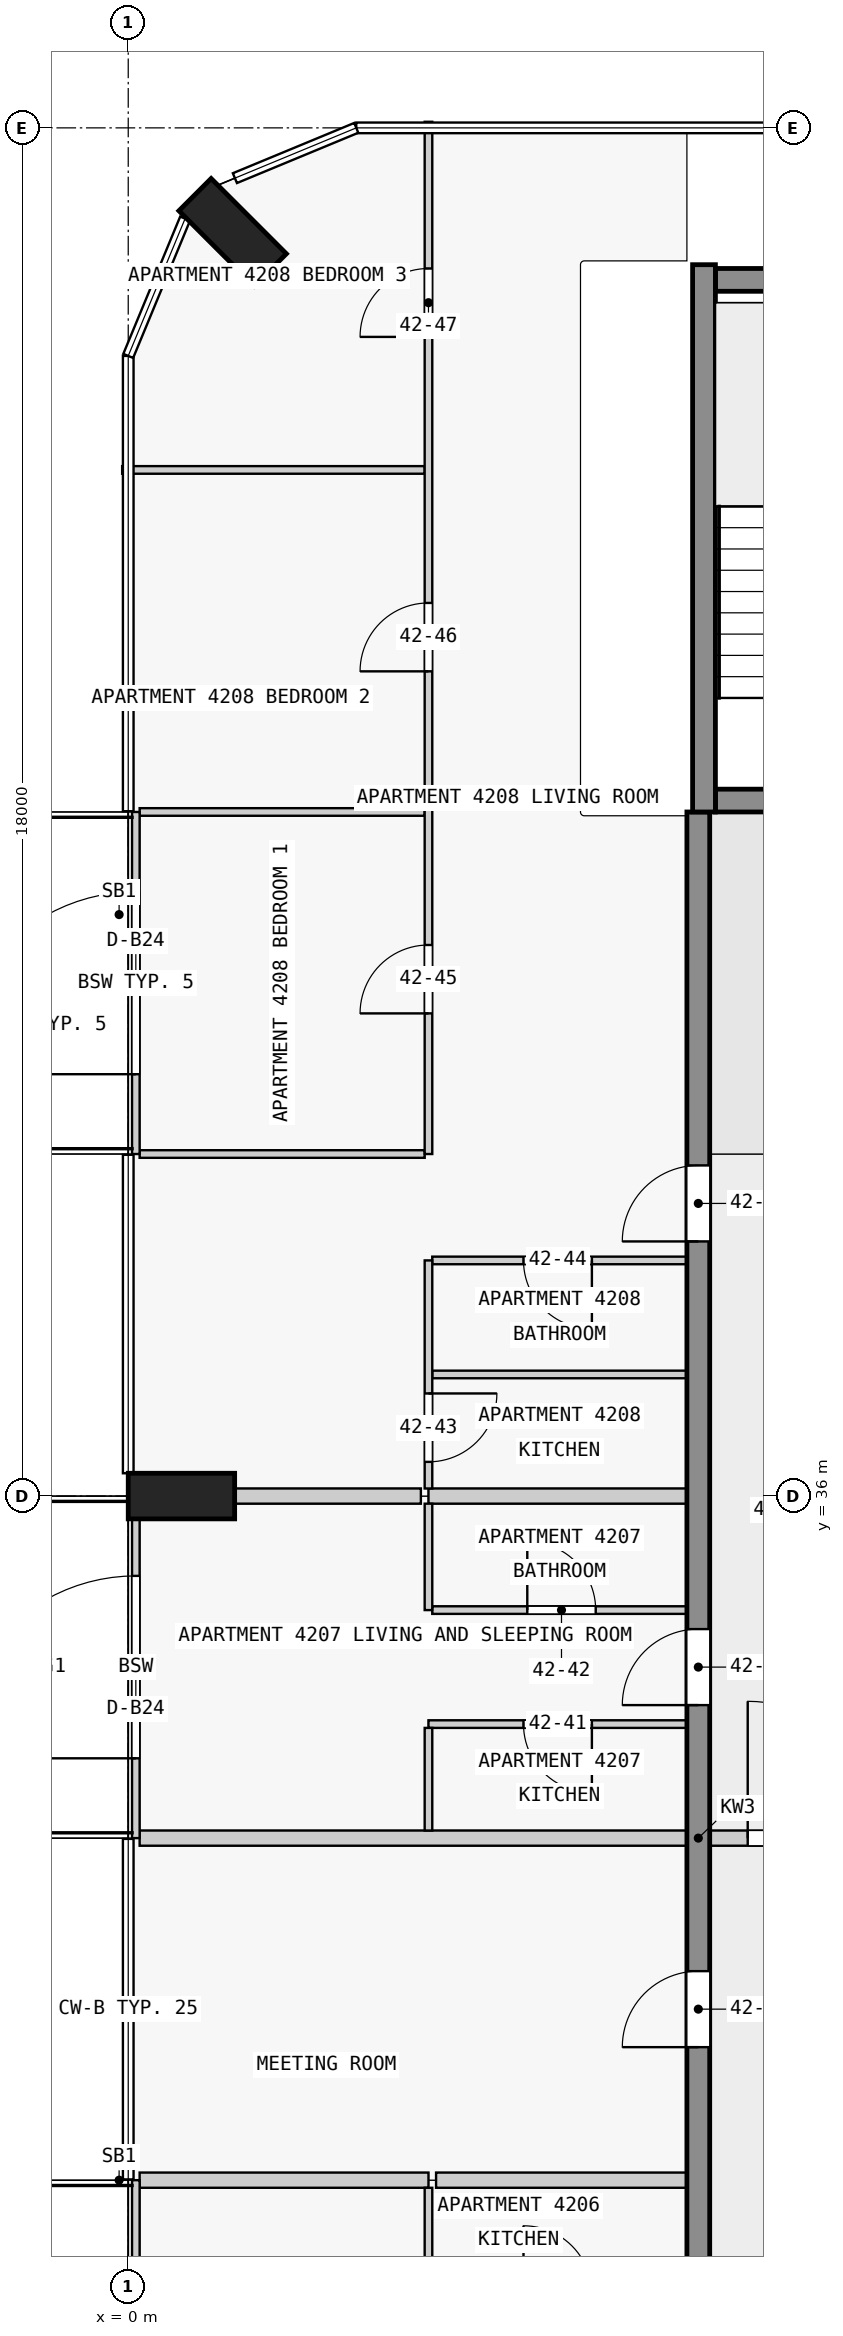
"""IFC4 building model, lengths in metres.
Left out: names, types, materials, properties, quantities, classifications, styles, units other than length and angle.
Written with IfcOpenShell. Run it as: python <this file> out.ifc"""

import sys

from ifc_helpers import new_model, si_unit, direction, frame, frame_2d, origin, origin_2d, place, context, subcontext, project, spatial, rectangle, extrude, element, fill, save


model = new_model("IFC4")
c1 = context("Model", 3, precision=1e-05, world=origin(), true_north=direction((0.0, 1.0)))
c2 = subcontext(c1, "Body", "Model", "MODEL_VIEW")
j1 = project(units=[si_unit("LENGTHUNIT", "METRE"), si_unit("PLANEANGLEUNIT", "RADIAN")], contexts=[c1])
p1 = place(None, origin())
s1 = spatial("IfcSite", under=j1, at=p1, CompositionType="ELEMENT")
p2 = place(p1, origin())
s2 = spatial("IfcBuilding", under=s1, at=p2, CompositionType="ELEMENT")
p3 = place(p2, frame((0.0, 0.0, 163.9)))
s3 = spatial("IfcBuildingStorey", under=s2, at=p3, CompositionType="ELEMENT", Elevation=163.9)
for number, where, z_axis, x_axis in (
    (1, (1.374, 52.626, 0.0), (0.0, 0.0, 1.0), (0.707, 0.707, 0.0)),
    (2, (0.7, 36.0, 0.0), (0.0, 0.0, 1.0), (0.0, 1.0, 0.0)),
):
    element("IfcColumn", number, at=place(p3, frame(where, z_axis=z_axis, x_axis=x_axis)), inside=s3, PredefinedType="COLUMN", context=c2, shape_type="SweptSolid", body=[
        extrude(rectangle(XDim=0.6, YDim=1.4, at=origin_2d()), origin(), (0.0, 0.0, 1.0), 3.5),
    ])
p4 = place(p3, frame((7.725, 45.15, 0.0), z_axis=(0.0, 0.0, 1.0), x_axis=(1.0, 0.0, 0.0)))
e3 = element("IfcWall", 3, at=p4, inside=s3, PredefinedType="SHEAR", context=c2, shape_type="SweptSolid", body=[
    extrude(rectangle(XDim=2.55, YDim=0.3, at=frame_2d((1.275, 0.0))), origin(), (0.0, 0.0, 1.0), 3.5),
])
p5 = place(p4, frame((0.725, 0.0, 0.0)))
e4 = element("IfcOpeningElement", 4, at=p5, cuts=e3, PredefinedType="OPENING", context=c2, shape_type="SweptSolid", body=[
    extrude(rectangle(XDim=1.1, YDim=2.1, at=frame_2d((0.55, 1.05))), frame((0.0, 0.16, 0.0), z_axis=(0.0, -1.0, 0.0), x_axis=(1.0, 0.0, 0.0)), (0.0, 0.0, 1.0), 0.32),
])
p6 = place(p3, frame((7.725, 52.0, 0.0), z_axis=(0.0, 0.0, 1.0), x_axis=(1.0, 0.0, 0.0)))
e5 = element("IfcWall", 5, at=p6, inside=s3, PredefinedType="SHEAR", context=c2, shape_type="SweptSolid", body=[
    extrude(rectangle(XDim=2.55, YDim=0.3, at=frame_2d((1.275, 0.0))), origin(), (0.0, 0.0, 1.0), 3.5),
])
p7 = place(p3, frame((7.575, 45.0, 0.0), z_axis=(0.0, 0.0, 1.0), x_axis=(0.0, 1.0, 0.0)))
e6 = element("IfcWall", 6, at=p7, inside=s3, PredefinedType="SHEAR", context=c2, shape_type="SweptSolid", body=[
    extrude(rectangle(XDim=7.2, YDim=0.3, at=frame_2d((3.6, 0.0))), origin(), (0.0, 0.0, 1.0), 3.5),
])
p8 = place(p3, frame((7.5, 18.0, 0.0), z_axis=(0.0, 0.0, 1.0), x_axis=(0.0, 1.0, 0.0)))
e7 = element("IfcWall", 7, at=p8, inside=s3, PredefinedType="SHEAR", context=c2, shape_type="SweptSolid", body=[
    extrude(rectangle(XDim=27.0, YDim=0.3, at=frame_2d((13.5, 0.0))), origin(), (0.0, 0.0, 1.0), 3.25),
])
p9 = place(p8, frame((1.75, 0.0, 0.0)))
e8 = element("IfcOpeningElement", 8, at=p9, cuts=e7, PredefinedType="OPENING", context=c2, shape_type="SweptSolid", body=[
    extrude(rectangle(XDim=1.0, YDim=2.1, at=frame_2d((0.5, 1.05))), frame((0.0, 0.16, 0.0), z_axis=(0.0, -1.0, 0.0), x_axis=(1.0, 0.0, 0.0)), (0.0, 0.0, 1.0), 0.32),
])
p10 = place(p8, frame((6.25, 0.0, 0.0)))
e9 = element("IfcOpeningElement", 9, at=p10, cuts=e7, PredefinedType="OPENING", context=c2, shape_type="SweptSolid", body=[
    extrude(rectangle(XDim=1.0, YDim=2.1, at=frame_2d((0.5, 1.05))), frame((0.0, 0.16, 0.0), z_axis=(0.0, -1.0, 0.0), x_axis=(1.0, 0.0, 0.0)), (0.0, 0.0, 1.0), 0.32),
])
p11 = place(p8, frame((10.75, 0.0, 0.0)))
e10 = element("IfcOpeningElement", 10, at=p11, cuts=e7, PredefinedType="OPENING", context=c2, shape_type="SweptSolid", body=[
    extrude(rectangle(XDim=1.0, YDim=2.1, at=frame_2d((0.5, 1.05))), frame((0.0, 0.16, 0.0), z_axis=(0.0, -1.0, 0.0), x_axis=(1.0, 0.0, 0.0)), (0.0, 0.0, 1.0), 0.32),
])
p12 = place(p8, frame((15.25, 0.0, 0.0)))
e11 = element("IfcOpeningElement", 11, at=p12, cuts=e7, PredefinedType="OPENING", context=c2, shape_type="SweptSolid", body=[
    extrude(rectangle(XDim=1.0, YDim=2.1, at=frame_2d((0.5, 1.05))), frame((0.0, 0.16, 0.0), z_axis=(0.0, -1.0, 0.0), x_axis=(1.0, 0.0, 0.0)), (0.0, 0.0, 1.0), 0.32),
])
p13 = place(p8, frame((21.35, 0.0, 0.0)))
e12 = element("IfcOpeningElement", 12, at=p13, cuts=e7, PredefinedType="OPENING", context=c2, shape_type="SweptSolid", body=[
    extrude(rectangle(XDim=1.0, YDim=2.1, at=frame_2d((0.5, 1.05))), frame((0.0, 0.16, 0.0), z_axis=(0.0, -1.0, 0.0), x_axis=(1.0, 0.0, 0.0)), (0.0, 0.0, 1.0), 0.32),
])
p14 = place(p3, frame((0.1, 22.5, 0.0), z_axis=(0.0, 0.0, 1.0), x_axis=(0.0, 1.0, 0.0)))
e13 = element("IfcWall", 13, at=p14, inside=s3, PredefinedType="STANDARD", context=c2, shape_type="SweptSolid", body=[
    extrude(rectangle(XDim=4.5, YDim=0.1, at=frame_2d((2.25, 0.0))), origin(), (0.0, 0.0, 1.0), 3.25),
])
p15 = place(p14, frame((1.05, 0.0, 0.0)))
e14 = element("IfcOpeningElement", 14, at=p15, cuts=e13, PredefinedType="OPENING", context=c2, shape_type="SweptSolid", body=[
    extrude(rectangle(XDim=2.4, YDim=2.4, at=frame_2d((1.2, 1.2))), frame((0.0, 0.06, 0.0), z_axis=(0.0, -1.0, 0.0), x_axis=(1.0, 0.0, 0.0)), (0.0, 0.0, 1.0), 0.12),
])
p16 = place(p3, frame((0.1, 31.5, 0.0), z_axis=(0.0, 0.0, 1.0), x_axis=(0.0, 1.0, 0.0)))
e15 = element("IfcWall", 15, at=p16, inside=s3, PredefinedType="STANDARD", context=c2, shape_type="SweptSolid", body=[
    extrude(rectangle(XDim=4.5, YDim=0.1, at=frame_2d((2.25, 0.0))), origin(), (0.0, 0.0, 1.0), 3.25),
])
p17 = place(p16, frame((1.05, 0.0, 0.0)))
e16 = element("IfcOpeningElement", 16, at=p17, cuts=e15, PredefinedType="OPENING", context=c2, shape_type="SweptSolid", body=[
    extrude(rectangle(XDim=2.4, YDim=2.4, at=frame_2d((1.2, 1.2))), frame((0.0, 0.06, 0.0), z_axis=(0.0, -1.0, 0.0), x_axis=(1.0, 0.0, 0.0)), (0.0, 0.0, 1.0), 0.12),
])
p18 = place(p3, frame((0.1, 40.5, 0.0), z_axis=(0.0, 0.0, 1.0), x_axis=(0.0, 1.0, 0.0)))
e17 = element("IfcWall", 17, at=p18, inside=s3, PredefinedType="STANDARD", context=c2, shape_type="SweptSolid", body=[
    extrude(rectangle(XDim=4.5, YDim=0.1, at=frame_2d((2.25, 0.0))), origin(), (0.0, 0.0, 1.0), 3.25),
])
p19 = place(p18, frame((1.05, 0.0, 0.0)))
e18 = element("IfcOpeningElement", 18, at=p19, cuts=e17, PredefinedType="OPENING", context=c2, shape_type="SweptSolid", body=[
    extrude(rectangle(XDim=2.4, YDim=2.4, at=frame_2d((1.2, 1.2))), frame((0.0, 0.06, 0.0), z_axis=(0.0, -1.0, 0.0), x_axis=(1.0, 0.0, 0.0)), (0.0, 0.0, 1.0), 0.12),
])
p20 = place(p3, frame((7.35, 27.0, 0.0), z_axis=(0.0, 0.0, 1.0), x_axis=(-1.0, 0.0, 0.0)))
e19 = element("IfcWall", 19, at=p20, inside=s3, PredefinedType="PARTITIONING", context=c2, shape_type="SweptSolid", body=[
    extrude(rectangle(XDim=3.3, YDim=0.2, at=frame_2d((1.65, 0.0))), origin(), (0.0, 0.0, 1.0), 3.25),
])
p21 = place(p3, frame((0.15, 27.0, 0.0), z_axis=(0.0, 0.0, 1.0), x_axis=(1.0, 0.0, 0.0)))
e20 = element("IfcWall", 20, at=p21, inside=s3, PredefinedType="PARTITIONING", context=c2, shape_type="SweptSolid", body=[
    extrude(rectangle(XDim=3.8, YDim=0.2, at=frame_2d((1.9, 0.0))), origin(), (0.0, 0.0, 1.0), 3.25),
])
p22 = place(p3, frame((7.35, 31.5, 0.0), z_axis=(0.0, 0.0, 1.0), x_axis=(-1.0, 0.0, 0.0)))
e21 = element("IfcWall", 21, at=p22, inside=s3, PredefinedType="PARTITIONING", context=c2, shape_type="SweptSolid", body=[
    extrude(rectangle(XDim=7.2, YDim=0.2, at=frame_2d((3.6, 0.0))), origin(), (0.0, 0.0, 1.0), 3.25),
])
p23 = place(p3, frame((7.35, 33.0, 0.0), z_axis=(0.0, 0.0, 1.0), x_axis=(-1.0, 0.0, 0.0)))
e22 = element("IfcWall", 22, at=p23, inside=s3, PredefinedType="PARTITIONING", context=c2, shape_type="SweptSolid", body=[
    extrude(rectangle(XDim=3.4, YDim=0.1, at=frame_2d((1.7, 0.0))), origin(), (0.0, 0.0, 1.0), 3.25),
])
p24 = place(p23, frame((1.25, 0.0, 0.0)))
e23 = element("IfcOpeningElement", 23, at=p24, cuts=e22, PredefinedType="OPENING", context=c2, shape_type="SweptSolid", body=[
    extrude(rectangle(XDim=0.9, YDim=2.1, at=frame_2d((0.45, 1.05))), frame((0.0, 0.06, 0.0), z_axis=(0.0, -1.0, 0.0), x_axis=(1.0, 0.0, 0.0)), (0.0, 0.0, 1.0), 0.12),
])
p25 = place(p3, frame((4.0, 34.5, 0.0), z_axis=(0.0, 0.0, 1.0), x_axis=(1.0, 0.0, 0.0)))
e24 = element("IfcWall", 24, at=p25, inside=s3, PredefinedType="PARTITIONING", context=c2, shape_type="SweptSolid", body=[
    extrude(rectangle(XDim=3.35, YDim=0.1, at=frame_2d((1.675, 0.0))), origin(), (0.0, 0.0, 1.0), 3.25),
])
p26 = place(p25, frame((1.25, 0.0, 0.0)))
e25 = element("IfcOpeningElement", 25, at=p26, cuts=e24, PredefinedType="OPENING", context=c2, shape_type="SweptSolid", body=[
    extrude(rectangle(XDim=0.9, YDim=2.1, at=frame_2d((0.45, 1.05))), frame((0.0, 0.06, 0.0), z_axis=(0.0, -1.0, 0.0), x_axis=(1.0, 0.0, 0.0)), (0.0, 0.0, 1.0), 0.12),
])
p27 = place(p3, frame((7.35, 36.0, 0.0), z_axis=(0.0, 0.0, 1.0), x_axis=(-1.0, 0.0, 0.0)))
e26 = element("IfcWall", 26, at=p27, inside=s3, PredefinedType="PARTITIONING", context=c2, shape_type="SweptSolid", body=[
    extrude(rectangle(XDim=3.4, YDim=0.2, at=frame_2d((1.7, 0.0))), origin(), (0.0, 0.0, 1.0), 3.25),
])
p28 = place(p3, frame((1.4, 36.0, 0.0), z_axis=(0.0, 0.0, 1.0), x_axis=(1.0, 0.0, 0.0)))
e27 = element("IfcWall", 27, at=p28, inside=s3, PredefinedType="PARTITIONING", context=c2, shape_type="SweptSolid", body=[
    extrude(rectangle(XDim=2.45, YDim=0.2, at=frame_2d((1.225, 0.0))), origin(), (0.0, 0.0, 1.0), 3.25),
])
p29 = place(p3, frame((7.35, 37.6, 0.0), z_axis=(0.0, 0.0, 1.0), x_axis=(-1.0, 0.0, 0.0)))
e28 = element("IfcWall", 28, at=p29, inside=s3, PredefinedType="PARTITIONING", context=c2, shape_type="SweptSolid", body=[
    extrude(rectangle(XDim=3.35, YDim=0.1, at=frame_2d((1.675, 0.0))), origin(), (0.0, 0.0, 1.0), 3.25),
])
p30 = place(p3, frame((7.35, 39.1, 0.0), z_axis=(0.0, 0.0, 1.0), x_axis=(-1.0, 0.0, 0.0)))
e29 = element("IfcWall", 29, at=p30, inside=s3, PredefinedType="PARTITIONING", context=c2, shape_type="SweptSolid", body=[
    extrude(rectangle(XDim=3.35, YDim=0.1, at=frame_2d((1.675, 0.0))), origin(), (0.0, 0.0, 1.0), 3.25),
])
p31 = place(p30, frame((1.25, 0.0, 0.0)))
e30 = element("IfcOpeningElement", 30, at=p31, cuts=e29, PredefinedType="OPENING", context=c2, shape_type="SweptSolid", body=[
    extrude(rectangle(XDim=0.9, YDim=2.1, at=frame_2d((0.45, 1.05))), frame((0.0, 0.06, 0.0), z_axis=(0.0, -1.0, 0.0), x_axis=(1.0, 0.0, 0.0)), (0.0, 0.0, 1.0), 0.12),
])
for number, where, z_axis, x_axis in (
    (31, (0.15, 40.5, 0.0), (0.0, 0.0, 1.0), (1.0, 0.0, 0.0)),
    (32, (3.9, 45.0, 0.0), (0.0, 0.0, 1.0), (-1.0, 0.0, 0.0)),
):
    element("IfcWall", number, at=place(p3, frame(where, z_axis=z_axis, x_axis=x_axis)), inside=s3, PredefinedType="PARTITIONING", context=c2, shape_type="SweptSolid", body=[
        extrude(rectangle(XDim=3.75, YDim=0.1, at=frame_2d((1.875, 0.0))), origin(), (0.0, 0.0, 1.0), 3.25),
    ])
p32 = place(p3, frame((3.9, 49.5, 0.0), z_axis=(0.0, 0.0, 1.0), x_axis=(-1.0, 0.0, 0.0)))
e33 = element("IfcWall", 33, at=p32, inside=s3, PredefinedType="PARTITIONING", context=c2, shape_type="SweptSolid", body=[
    extrude(rectangle(XDim=3.98, YDim=0.1, at=frame_2d((1.99, 0.0))), origin(), (0.0, 0.0, 1.0), 3.25),
])
for number, where, z_axis, x_axis in (
    (34, (3.95, 26.9, 0.0), (0.0, 0.0, 1.0), (0.0, -1.0, 0.0)),
    (35, (3.95, 32.95, 0.0), (0.0, 0.0, 1.0), (0.0, -1.0, 0.0)),
):
    element("IfcWall", number, at=place(p3, frame(where, z_axis=z_axis, x_axis=x_axis)), inside=s3, PredefinedType="PARTITIONING", context=c2, shape_type="SweptSolid", body=[
        extrude(rectangle(XDim=1.35, YDim=0.1, at=frame_2d((0.675, 0.0))), origin(), (0.0, 0.0, 1.0), 3.25),
    ])
p33 = place(p3, frame((3.95, 35.9, 0.0), z_axis=(0.0, 0.0, 1.0), x_axis=(0.0, -1.0, 0.0)))
e36 = element("IfcWall", 36, at=p33, inside=s3, PredefinedType="PARTITIONING", context=c2, shape_type="SweptSolid", body=[
    extrude(rectangle(XDim=1.4, YDim=0.1, at=frame_2d((0.7, 0.0))), origin(), (0.0, 0.0, 1.0), 3.25),
])
p34 = place(p3, frame((3.95, 39.1, 0.0), z_axis=(0.0, 0.0, 1.0), x_axis=(0.0, -1.0, 0.0)))
e37 = element("IfcWall", 37, at=p34, inside=s3, PredefinedType="PARTITIONING", context=c2, shape_type="SweptSolid", body=[
    extrude(rectangle(XDim=3.0, YDim=0.1, at=frame_2d((1.5, 0.0))), origin(), (0.0, 0.0, 1.0), 3.25),
])
p35 = place(p34, frame((1.75, 0.0, 0.0)))
e38 = element("IfcOpeningElement", 38, at=p35, cuts=e37, PredefinedType="OPENING", context=c2, shape_type="SweptSolid", body=[
    extrude(rectangle(XDim=0.9, YDim=2.1, at=frame_2d((0.45, 1.05))), frame((0.0, 0.06, 0.0), z_axis=(0.0, -1.0, 0.0), x_axis=(1.0, 0.0, 0.0)), (0.0, 0.0, 1.0), 0.12),
])
p36 = place(p3, frame((3.95, 40.5, 0.0), z_axis=(0.0, 0.0, 1.0), x_axis=(0.0, 1.0, 0.0)))
e39 = element("IfcWall", 39, at=p36, inside=s3, PredefinedType="PARTITIONING", context=c2, shape_type="SweptSolid", body=[
    extrude(rectangle(XDim=13.58, YDim=0.1, at=frame_2d((6.79, 0.0))), origin(), (0.0, 0.0, 1.0), 3.25),
])
p37 = place(p36, frame((1.85, 0.0, 0.0)))
e40 = element("IfcOpeningElement", 40, at=p37, cuts=e39, PredefinedType="OPENING", context=c2, shape_type="SweptSolid", body=[
    extrude(rectangle(XDim=0.9, YDim=2.1, at=frame_2d((0.45, 1.05))), frame((0.0, 0.06, 0.0), z_axis=(0.0, -1.0, 0.0), x_axis=(1.0, 0.0, 0.0)), (0.0, 0.0, 1.0), 0.12),
])
p38 = place(p36, frame((6.35, 0.0, 0.0)))
e41 = element("IfcOpeningElement", 41, at=p38, cuts=e39, PredefinedType="OPENING", context=c2, shape_type="SweptSolid", body=[
    extrude(rectangle(XDim=0.9, YDim=2.1, at=frame_2d((0.45, 1.05))), frame((0.0, 0.06, 0.0), z_axis=(0.0, -1.0, 0.0), x_axis=(1.0, 0.0, 0.0)), (0.0, 0.0, 1.0), 0.12),
])
p39 = place(p36, frame((10.75, 0.0, 0.0)))
e42 = element("IfcOpeningElement", 42, at=p39, cuts=e39, PredefinedType="OPENING", context=c2, shape_type="SweptSolid", body=[
    extrude(rectangle(XDim=0.9, YDim=2.1, at=frame_2d((0.45, 1.05))), frame((0.0, 0.06, 0.0), z_axis=(0.0, -1.0, 0.0), x_axis=(1.0, 0.0, 0.0)), (0.0, 0.0, 1.0), 0.12),
])
p40 = place(p3, frame((7.45, 31.5, 0.0), z_axis=(0.0, 0.0, 1.0), x_axis=(1.0, 0.0, 0.0)))
e43 = element("IfcWall", 43, at=p40, inside=s3, PredefinedType="PARTITIONING", context=c2, shape_type="SweptSolid", body=[
    extrude(rectangle(XDim=3.1, YDim=0.2, at=frame_2d((1.55, 0.0))), origin(), (0.0, 0.0, 1.0), 3.25),
])
p41 = place(p40, frame((0.7, 0.0, 0.0)))
e44 = element("IfcOpeningElement", 44, at=p41, cuts=e43, PredefinedType="OPENING", context=c2, shape_type="SweptSolid", body=[
    extrude(rectangle(XDim=1.8, YDim=2.1, at=frame_2d((0.9, 1.05))), frame((0.0, 0.11, 0.0), z_axis=(0.0, -1.0, 0.0), x_axis=(1.0, 0.0, 0.0)), (0.0, 0.0, 1.0), 0.22),
])
p42 = place(p17, origin())
e45 = element("IfcDoor", 45, at=p42, inside=s3, OperationType="SINGLE_SWING_LEFT", PredefinedType="DOOR", context=c2, shape_type="SweptSolid", body=[
    extrude(rectangle(XDim=2.4, YDim=2.4, at=frame_2d((1.2, 1.2))), frame((0.0, 0.025, 0.0), z_axis=(0.0, -1.0, 0.0), x_axis=(1.0, 0.0, 0.0)), (0.0, 0.0, 1.0), 0.05),
])
fill(e16, e45)
p43 = place(p19, origin())
e46 = element("IfcDoor", 46, at=p43, inside=s3, OperationType="SINGLE_SWING_LEFT", PredefinedType="DOOR", context=c2, shape_type="SweptSolid", body=[
    extrude(rectangle(XDim=2.4, YDim=2.4, at=frame_2d((1.2, 1.2))), frame((0.0, 0.025, 0.0), z_axis=(0.0, -1.0, 0.0), x_axis=(1.0, 0.0, 0.0)), (0.0, 0.0, 1.0), 0.05),
])
fill(e18, e46)
p44 = place(p11, origin())
e47 = element("IfcDoor", 47, at=p44, inside=s3, OperationType="SINGLE_SWING_LEFT", PredefinedType="DOOR", context=c2, shape_type="SweptSolid", body=[
    extrude(rectangle(XDim=1.0, YDim=2.1, at=frame_2d((0.5, 1.05))), frame((0.0, 0.025, 0.0), z_axis=(0.0, -1.0, 0.0), x_axis=(1.0, 0.0, 0.0)), (0.0, 0.0, 1.0), 0.05),
])
fill(e10, e47)
p45 = place(p12, origin())
e48 = element("IfcDoor", 48, at=p45, inside=s3, OperationType="SINGLE_SWING_RIGHT", PredefinedType="DOOR", context=c2, shape_type="SweptSolid", body=[
    extrude(rectangle(XDim=1.0, YDim=2.1, at=frame_2d((0.5, 1.05))), frame((0.0, 0.025, 0.0), z_axis=(0.0, -1.0, 0.0), x_axis=(1.0, 0.0, 0.0)), (0.0, 0.0, 1.0), 0.05),
])
fill(e11, e48)
p46 = place(p13, origin())
e49 = element("IfcDoor", 49, at=p46, inside=s3, OperationType="SINGLE_SWING_RIGHT", PredefinedType="DOOR", context=c2, shape_type="SweptSolid", body=[
    extrude(rectangle(XDim=1.0, YDim=2.1, at=frame_2d((0.5, 1.05))), frame((0.0, 0.025, 0.0), z_axis=(0.0, -1.0, 0.0), x_axis=(1.0, 0.0, 0.0)), (0.0, 0.0, 1.0), 0.05),
])
fill(e12, e49)
p47 = place(p41, origin())
e50 = element("IfcDoor", 50, at=p47, inside=s3, OperationType="SINGLE_SWING_RIGHT", PredefinedType="DOOR", context=c2, shape_type="SweptSolid", body=[
    extrude(rectangle(XDim=1.8, YDim=2.1, at=frame_2d((0.9, 1.05))), frame((0.0, 0.025, 0.0), z_axis=(0.0, -1.0, 0.0), x_axis=(1.0, 0.0, 0.0)), (0.0, 0.0, 1.0), 0.05),
])
fill(e44, e50)
p48 = place(p24, origin())
e51 = element("IfcDoor", 51, at=p48, inside=s3, OperationType="SINGLE_SWING_RIGHT", PredefinedType="DOOR", context=c2, shape_type="SweptSolid", body=[
    extrude(rectangle(XDim=0.9, YDim=2.1, at=frame_2d((0.45, 1.05))), frame((0.0, 0.025, 0.0), z_axis=(0.0, -1.0, 0.0), x_axis=(1.0, 0.0, 0.0)), (0.0, 0.0, 1.0), 0.05),
])
fill(e23, e51)
p49 = place(p26, origin())
e52 = element("IfcDoor", 52, at=p49, inside=s3, OperationType="SINGLE_SWING_RIGHT", PredefinedType="DOOR", context=c2, shape_type="SweptSolid", body=[
    extrude(rectangle(XDim=0.9, YDim=2.1, at=frame_2d((0.45, 1.05))), frame((0.0, 0.025, 0.0), z_axis=(0.0, -1.0, 0.0), x_axis=(1.0, 0.0, 0.0)), (0.0, 0.0, 1.0), 0.05),
])
fill(e25, e52)
p50 = place(p35, origin())
e53 = element("IfcDoor", 53, at=p50, inside=s3, OperationType="SINGLE_SWING_RIGHT", PredefinedType="DOOR", context=c2, shape_type="SweptSolid", body=[
    extrude(rectangle(XDim=0.9, YDim=2.1, at=frame_2d((0.45, 1.05))), frame((0.0, 0.025, 0.0), z_axis=(0.0, -1.0, 0.0), x_axis=(1.0, 0.0, 0.0)), (0.0, 0.0, 1.0), 0.05),
])
fill(e38, e53)
p51 = place(p31, origin())
e54 = element("IfcDoor", 54, at=p51, inside=s3, OperationType="SINGLE_SWING_RIGHT", PredefinedType="DOOR", context=c2, shape_type="SweptSolid", body=[
    extrude(rectangle(XDim=0.9, YDim=2.1, at=frame_2d((0.45, 1.05))), frame((0.0, 0.025, 0.0), z_axis=(0.0, -1.0, 0.0), x_axis=(1.0, 0.0, 0.0)), (0.0, 0.0, 1.0), 0.05),
])
fill(e30, e54)
p52 = place(p37, origin())
e55 = element("IfcDoor", 55, at=p52, inside=s3, OperationType="SINGLE_SWING_LEFT", PredefinedType="DOOR", context=c2, shape_type="SweptSolid", body=[
    extrude(rectangle(XDim=0.9, YDim=2.1, at=frame_2d((0.45, 1.05))), frame((0.0, 0.025, 0.0), z_axis=(0.0, -1.0, 0.0), x_axis=(1.0, 0.0, 0.0)), (0.0, 0.0, 1.0), 0.05),
])
fill(e40, e55)
p53 = place(p38, origin())
e56 = element("IfcDoor", 56, at=p53, inside=s3, OperationType="SINGLE_SWING_RIGHT", PredefinedType="DOOR", context=c2, shape_type="SweptSolid", body=[
    extrude(rectangle(XDim=0.9, YDim=2.1, at=frame_2d((0.45, 1.05))), frame((0.0, 0.025, 0.0), z_axis=(0.0, -1.0, 0.0), x_axis=(1.0, 0.0, 0.0)), (0.0, 0.0, 1.0), 0.05),
])
fill(e41, e56)
p54 = place(p39, origin())
e57 = element("IfcDoor", 57, at=p54, inside=s3, OperationType="SINGLE_SWING_RIGHT", PredefinedType="DOOR", context=c2, shape_type="SweptSolid", body=[
    extrude(rectangle(XDim=0.9, YDim=2.1, at=frame_2d((0.45, 1.05))), frame((0.0, 0.025, 0.0), z_axis=(0.0, -1.0, 0.0), x_axis=(1.0, 0.0, 0.0)), (0.0, 0.0, 1.0), 0.05),
])
fill(e42, e57)
save(model, sys.argv[1])
